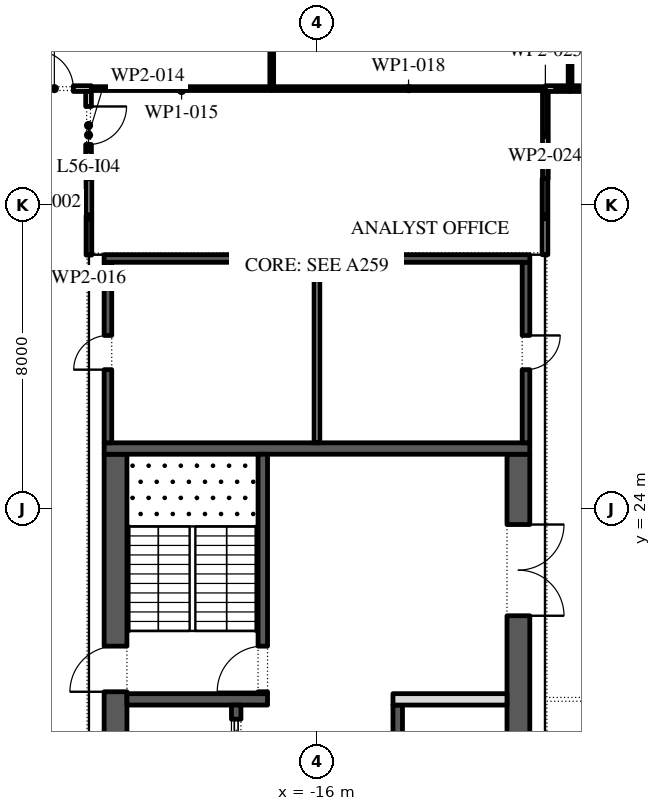
"""IFC4 building model, lengths in metres.
Left out: names, types, materials, properties, quantities, classifications, styles, units other than length and angle.
Written with IfcOpenShell. Run it as: python <this file> out.ifc"""

import sys

from ifc_helpers import new_model, si_unit, direction, frame, frame_2d, origin, place, context, subcontext, project, spatial, rectangle, extrude, element, fill, save


model = new_model("IFC4")
c1 = context("Model", 3, precision=1e-05, world=origin(), true_north=direction((0.0, 1.0)))
c2 = subcontext(c1, "Body", "Model", "MODEL_VIEW")
j1 = project(units=[si_unit("LENGTHUNIT", "METRE"), si_unit("PLANEANGLEUNIT", "RADIAN")], contexts=[c1])
p1 = place(None, origin())
s1 = spatial("IfcSite", under=j1, at=p1, CompositionType="ELEMENT")
p2 = place(p1, origin())
s2 = spatial("IfcBuilding", under=s1, at=p2, CompositionType="ELEMENT")
p3 = place(p2, frame((0.0, 0.0, 259.8)))
s3 = spatial("IfcBuildingStorey", under=s2, at=p3, CompositionType="ELEMENT", Elevation=259.8)
p4 = place(p3, frame((-21.359, 48.678, 0.0), z_axis=(0.0, 0.0, 1.0), x_axis=(-0.224949198343, -0.974370493275, 0.0)))
e1 = element("IfcWall", 1, at=p4, inside=s3, PredefinedType="STANDARD", context=c2, shape_type="SweptSolid", body=[
    extrude(rectangle(XDim=49.5, YDim=0.3, at=frame_2d((24.75, 0.0))), origin(), (0.0, 0.0, 1.0), 4.0),
])
p5 = place(p4, frame((1.157, 0.0, 0.45)))
e2 = element("IfcOpeningElement", 2, at=p5, cuts=e1, PredefinedType="OPENING", context=c2, shape_type="SweptSolid", body=[
    extrude(rectangle(XDim=4.5, YDim=3.05, at=frame_2d((2.25, 1.525))), frame((0.0, 0.16, 0.0), z_axis=(0.0, -1.0, 0.0), x_axis=(1.0, 0.0, 0.0)), (0.0, 0.0, 1.0), 0.32),
])
p6 = place(p4, frame((9.171, 0.0, 0.0)))
e3 = element("IfcOpeningElement", 3, at=p6, cuts=e1, PredefinedType="OPENING", context=c2, shape_type="SweptSolid", body=[
    extrude(rectangle(XDim=2.4, YDim=3.5, at=frame_2d((1.2, 1.75))), frame((0.0, 0.16, 0.0), z_axis=(0.0, -1.0, 0.0), x_axis=(1.0, 0.0, 0.0)), (0.0, 0.0, 1.0), 0.32),
])
p7 = place(p4, frame((15.236, 0.0, 0.45)))
e4 = element("IfcOpeningElement", 4, at=p7, cuts=e1, PredefinedType="OPENING", context=c2, shape_type="SweptSolid", body=[
    extrude(rectangle(XDim=4.5, YDim=3.05, at=frame_2d((2.25, 1.525))), frame((0.0, 0.16, 0.0), z_axis=(0.0, -1.0, 0.0), x_axis=(1.0, 0.0, 0.0)), (0.0, 0.0, 1.0), 0.32),
])
p8 = place(p4, frame((22.35, 0.0, 0.45)))
e5 = element("IfcOpeningElement", 5, at=p8, cuts=e1, PredefinedType="OPENING", context=c2, shape_type="SweptSolid", body=[
    extrude(rectangle(XDim=4.5, YDim=3.05, at=frame_2d((2.25, 1.525))), frame((0.0, 0.16, 0.0), z_axis=(0.0, -1.0, 0.0), x_axis=(1.0, 0.0, 0.0)), (0.0, 0.0, 1.0), 0.32),
])
p9 = place(p4, frame((29.464, 0.0, 0.45)))
e6 = element("IfcOpeningElement", 6, at=p9, cuts=e1, PredefinedType="OPENING", context=c2, shape_type="SweptSolid", body=[
    extrude(rectangle(XDim=4.5, YDim=3.05, at=frame_2d((2.25, 1.525))), frame((0.0, 0.16, 0.0), z_axis=(0.0, -1.0, 0.0), x_axis=(1.0, 0.0, 0.0)), (0.0, 0.0, 1.0), 0.32),
])
p10 = place(p4, frame((37.628, 0.0, 0.0)))
e7 = element("IfcOpeningElement", 7, at=p10, cuts=e1, PredefinedType="OPENING", context=c2, shape_type="SweptSolid", body=[
    extrude(rectangle(XDim=2.4, YDim=3.325, at=frame_2d((1.2, 1.663))), frame((0.0, 0.16, 0.0), z_axis=(0.0, -1.0, 0.0), x_axis=(1.0, 0.0, 0.0)), (0.0, 0.0, 1.0), 0.32),
])
p11 = place(p4, frame((43.693, 0.0, 0.45)))
e8 = element("IfcOpeningElement", 8, at=p11, cuts=e1, PredefinedType="OPENING", context=c2, shape_type="SweptSolid", body=[
    extrude(rectangle(XDim=4.5, YDim=2.825, at=frame_2d((2.25, 1.413))), frame((0.0, 0.16, 0.0), z_axis=(0.0, -1.0, 0.0), x_axis=(1.0, 0.0, 0.0)), (0.0, 0.0, 1.0), 0.32),
])
p12 = place(p3, frame((-21.3, -2.45, 0.0), z_axis=(0.0, 0.0, 1.0), x_axis=(0.0, 1.0, 0.0)))
e9 = element("IfcWall", 9, at=p12, inside=s3, PredefinedType="SHEAR", context=c2, shape_type="SweptSolid", body=[
    extrude(rectangle(XDim=27.9, YDim=0.6, at=frame_2d((13.95, 0.0))), origin(), (0.0, 0.0, 1.0), 4.0),
])
p13 = place(p12, frame((5.05, 0.0, 0.0)))
e10 = element("IfcOpeningElement", 10, at=p13, cuts=e9, PredefinedType="OPENING", context=c2, shape_type="SweptSolid", body=[
    extrude(rectangle(XDim=1.2, YDim=2.1, at=frame_2d((0.6, 1.05))), frame((0.0, 0.31, 0.0), z_axis=(0.0, -1.0, 0.0), x_axis=(1.0, 0.0, 0.0)), (0.0, 0.0, 1.0), 0.62),
])
p14 = place(p12, frame((21.65, 0.0, 0.0)))
e11 = element("IfcOpeningElement", 11, at=p14, cuts=e9, PredefinedType="OPENING", context=c2, shape_type="SweptSolid", body=[
    extrude(rectangle(XDim=1.2, YDim=2.1, at=frame_2d((0.6, 1.05))), frame((0.0, 0.31, 0.0), z_axis=(0.0, -1.0, 0.0), x_axis=(1.0, 0.0, 0.0)), (0.0, 0.0, 1.0), 0.62),
])
p15 = place(p3, frame((-10.7, -2.45, 0.0), z_axis=(0.0, 0.0, 1.0), x_axis=(0.0, 1.0, 0.0)))
e12 = element("IfcWall", 12, at=p15, inside=s3, PredefinedType="SHEAR", context=c2, shape_type="SweptSolid", body=[
    extrude(rectangle(XDim=27.9, YDim=0.6, at=frame_2d((13.95, 0.0))), origin(), (0.0, 0.0, 1.0), 4.0),
])
p16 = place(p15, frame((23.65, 0.0, 0.0)))
e13 = element("IfcOpeningElement", 13, at=p16, cuts=e12, PredefinedType="OPENING", context=c2, shape_type="SweptSolid", body=[
    extrude(rectangle(XDim=2.4, YDim=2.1, at=frame_2d((1.2, 1.05))), frame((0.0, 0.31, 0.0), z_axis=(0.0, -1.0, 0.0), x_axis=(1.0, 0.0, 0.0)), (0.0, 0.0, 1.0), 0.62),
])
p17 = place(p15, frame((1.087, 0.0, 0.0)))
e14 = element("IfcOpeningElement", 14, at=p17, cuts=e12, PredefinedType="OPENING", context=c2, shape_type="SweptSolid", body=[
    extrude(rectangle(XDim=0.9, YDim=2.1, at=frame_2d((0.45, 1.05))), frame((0.0, 0.31, 0.0), z_axis=(0.0, -1.0, 0.0), x_axis=(1.0, 0.0, 0.0)), (0.0, 0.0, 1.0), 0.62),
])
p18 = place(p15, frame((4.262, 0.0, 0.0)))
e15 = element("IfcOpeningElement", 15, at=p18, cuts=e12, PredefinedType="OPENING", context=c2, shape_type="SweptSolid", body=[
    extrude(rectangle(XDim=1.0, YDim=2.1, at=frame_2d((0.5, 1.05))), frame((0.0, 0.31, 0.0), z_axis=(0.0, -1.0, 0.0), x_axis=(1.0, 0.0, 0.0)), (0.0, 0.0, 1.0), 0.62),
])
p19 = place(p3, frame((-21.6, 25.6, 0.0), z_axis=(0.0, 0.0, 1.0), x_axis=(1.0, 0.0, 0.0)))
e16 = element("IfcWall", 16, at=p19, inside=s3, PredefinedType="SHEAR", context=c2, shape_type="SweptSolid", body=[
    extrude(rectangle(XDim=11.2, YDim=0.3, at=frame_2d((5.6, 0.0))), origin(), (0.0, 0.0, 1.0), 4.0),
])
p20 = place(p3, frame((-21.0, 19.0, 0.0), z_axis=(0.0, 0.0, 1.0), x_axis=(1.0, 0.0, 0.0)))
e17 = element("IfcWall", 17, at=p20, inside=s3, PredefinedType="SHEAR", context=c2, shape_type="SweptSolid", body=[
    extrude(rectangle(XDim=3.7, YDim=0.3, at=frame_2d((1.85, 0.0))), origin(), (0.0, 0.0, 1.0), 4.0),
])
p21 = place(p3, frame((-17.425, 19.15, 0.0), z_axis=(0.0, 0.0, 1.0), x_axis=(0.0, 1.0, 0.0)))
e18 = element("IfcWall", 18, at=p21, inside=s3, PredefinedType="SHEAR", context=c2, shape_type="SweptSolid", body=[
    extrude(rectangle(XDim=6.3, YDim=0.25, at=frame_2d((3.15, 0.0))), origin(), (0.0, 0.0, 1.0), 4.0),
])
p22 = place(p21, frame((0.05, 0.0, 0.0)))
e19 = element("IfcOpeningElement", 19, at=p22, cuts=e18, PredefinedType="OPENING", context=c2, shape_type="SweptSolid", body=[
    extrude(rectangle(XDim=1.2, YDim=2.1, at=frame_2d((0.6, 1.05))), frame((0.0, 0.135, 0.0), z_axis=(0.0, -1.0, 0.0), x_axis=(1.0, 0.0, 0.0)), (0.0, 0.0, 1.0), 0.27),
])
p23 = place(p3, frame((-18.125, 4.15, 0.0), z_axis=(0.0, 0.0, 1.0), x_axis=(0.0, 1.0, 0.0)))
e20 = element("IfcWall", 20, at=p23, inside=s3, PredefinedType="SHEAR", context=c2, shape_type="SweptSolid", body=[
    extrude(rectangle(XDim=14.7, YDim=0.25, at=frame_2d((7.35, 0.0))), origin(), (0.0, 0.0, 1.0), 4.0),
])
p24 = place(p23, frame((6.9, 0.0, 0.0)))
e21 = element("IfcOpeningElement", 21, at=p24, cuts=e20, PredefinedType="OPENING", context=c2, shape_type="SweptSolid", body=[
    extrude(rectangle(XDim=0.9, YDim=2.1, at=frame_2d((0.45, 1.05))), frame((0.0, 0.135, 0.0), z_axis=(0.0, -1.0, 0.0), x_axis=(1.0, 0.0, 0.0)), (0.0, 0.0, 1.0), 0.27),
])
p25 = place(p23, frame((0.371, 0.0, 0.0)))
e22 = element("IfcOpeningElement", 22, at=p25, cuts=e20, PredefinedType="OPENING", context=c2, shape_type="SweptSolid", body=[
    extrude(rectangle(XDim=1.1, YDim=2.1, at=frame_2d((0.55, 1.05))), frame((0.0, 0.135, 0.0), z_axis=(0.0, -1.0, 0.0), x_axis=(1.0, 0.0, 0.0)), (0.0, 0.0, 1.0), 0.27),
])
p26 = place(p23, frame((13.229, 0.0, 0.0)))
e23 = element("IfcOpeningElement", 23, at=p26, cuts=e20, PredefinedType="OPENING", context=c2, shape_type="SweptSolid", body=[
    extrude(rectangle(XDim=1.1, YDim=2.1, at=frame_2d((0.55, 1.05))), frame((0.0, 0.135, 0.0), z_axis=(0.0, -1.0, 0.0), x_axis=(1.0, 0.0, 0.0)), (0.0, 0.0, 1.0), 0.27),
])
p27 = place(p3, frame((-13.875, -2.45, 0.0), z_axis=(0.0, 0.0, 1.0), x_axis=(0.0, 1.0, 0.0)))
e24 = element("IfcWall", 24, at=p27, inside=s3, PredefinedType="SHEAR", context=c2, shape_type="SweptSolid", body=[
    extrude(rectangle(XDim=21.3, YDim=0.25, at=frame_2d((10.65, 0.0))), origin(), (0.0, 0.0, 1.0), 4.0),
])
p28 = place(p27, frame((17.786, 0.0, 0.0)))
e25 = element("IfcOpeningElement", 25, at=p28, cuts=e24, PredefinedType="OPENING", context=c2, shape_type="SweptSolid", body=[
    extrude(rectangle(XDim=0.9, YDim=2.1, at=frame_2d((0.45, 1.05))), frame((0.0, 0.135, 0.0), z_axis=(0.0, -1.0, 0.0), x_axis=(1.0, 0.0, 0.0)), (0.0, 0.0, 1.0), 0.27),
])
p29 = place(p27, frame((6.971, 0.0, 0.0)))
e26 = element("IfcOpeningElement", 26, at=p29, cuts=e24, PredefinedType="OPENING", context=c2, shape_type="SweptSolid", body=[
    extrude(rectangle(XDim=1.1, YDim=2.1, at=frame_2d((0.55, 1.05))), frame((0.0, 0.135, 0.0), z_axis=(0.0, -1.0, 0.0), x_axis=(1.0, 0.0, 0.0)), (0.0, 0.0, 1.0), 0.27),
])
p30 = place(p27, frame((9.114, 0.0, 0.0)))
e27 = element("IfcOpeningElement", 27, at=p30, cuts=e24, PredefinedType="OPENING", context=c2, shape_type="SweptSolid", body=[
    extrude(rectangle(XDim=1.1, YDim=2.1, at=frame_2d((0.55, 1.05))), frame((0.0, 0.135, 0.0), z_axis=(0.0, -1.0, 0.0), x_axis=(1.0, 0.0, 0.0)), (0.0, 0.0, 1.0), 0.27),
])
p31 = place(p27, frame((11.257, 0.0, 0.0)))
e28 = element("IfcOpeningElement", 28, at=p31, cuts=e24, PredefinedType="OPENING", context=c2, shape_type="SweptSolid", body=[
    extrude(rectangle(XDim=1.1, YDim=2.1, at=frame_2d((0.55, 1.05))), frame((0.0, 0.135, 0.0), z_axis=(0.0, -1.0, 0.0), x_axis=(1.0, 0.0, 0.0)), (0.0, 0.0, 1.0), 0.27),
])
p32 = place(p27, frame((13.4, 0.0, 0.0)))
e29 = element("IfcOpeningElement", 29, at=p32, cuts=e24, PredefinedType="OPENING", context=c2, shape_type="SweptSolid", body=[
    extrude(rectangle(XDim=1.1, YDim=2.1, at=frame_2d((0.55, 1.05))), frame((0.0, 0.135, 0.0), z_axis=(0.0, -1.0, 0.0), x_axis=(1.0, 0.0, 0.0)), (0.0, 0.0, 1.0), 0.27),
])
p33 = place(p3, frame((-14.0, 19.0, 0.0), z_axis=(0.0, 0.0, 1.0), x_axis=(1.0, 0.0, 0.0)))
e30 = element("IfcWall", 30, at=p33, inside=s3, PredefinedType="PARTITIONING", context=c2, shape_type="SweptSolid", body=[
    extrude(rectangle(XDim=3.0, YDim=0.3, at=frame_2d((1.5, 0.0))), origin(), (0.0, 0.0, 1.0), 4.0),
])
p34 = place(p3, frame((-21.5, 25.75, 0.0), z_axis=(0.0, 0.0, 1.0), x_axis=(0.0, 1.0, 0.0)))
e31 = element("IfcWall", 31, at=p34, inside=s3, PredefinedType="SHEAR", context=c2, shape_type="SweptSolid", body=[
    extrude(rectangle(XDim=4.75, YDim=0.2, at=frame_2d((2.375, 0.0))), origin(), (0.0, 0.0, 1.0), 4.0),
])
p35 = place(p34, frame((1.925, 0.0, 0.0)))
e32 = element("IfcOpeningElement", 32, at=p35, cuts=e31, PredefinedType="OPENING", context=c2, shape_type="SweptSolid", body=[
    extrude(rectangle(XDim=0.9, YDim=2.1, at=frame_2d((0.45, 1.05))), frame((0.0, 0.11, 0.0), z_axis=(0.0, -1.0, 0.0), x_axis=(1.0, 0.0, 0.0)), (0.0, 0.0, 1.0), 0.22),
])
p36 = place(p3, frame((-10.5, 25.75, 0.0), z_axis=(0.0, 0.0, 1.0), x_axis=(0.0, 1.0, 0.0)))
e33 = element("IfcWall", 33, at=p36, inside=s3, PredefinedType="SHEAR", context=c2, shape_type="SweptSolid", body=[
    extrude(rectangle(XDim=4.75, YDim=0.2, at=frame_2d((2.375, 0.0))), origin(), (0.0, 0.0, 1.0), 4.0),
])
p37 = place(p36, frame((1.925, 0.0, 0.0)))
e34 = element("IfcOpeningElement", 34, at=p37, cuts=e33, PredefinedType="OPENING", context=c2, shape_type="SweptSolid", body=[
    extrude(rectangle(XDim=0.9, YDim=2.1, at=frame_2d((0.45, 1.05))), frame((0.0, 0.11, 0.0), z_axis=(0.0, -1.0, 0.0), x_axis=(1.0, 0.0, 0.0)), (0.0, 0.0, 1.0), 0.22),
])
p38 = place(p3, frame((-21.6, 30.6, 0.0), z_axis=(0.0, 0.0, 1.0), x_axis=(1.0, 0.0, 0.0)))
e35 = element("IfcWall", 35, at=p38, inside=s3, PredefinedType="SHEAR", context=c2, shape_type="SweptSolid", body=[
    extrude(rectangle(XDim=11.2, YDim=0.2, at=frame_2d((5.6, 0.0))), origin(), (0.0, 0.0, 1.0), 4.0),
])
p39 = place(p3, frame((-16.0, 25.75, 0.0), z_axis=(0.0, 0.0, 1.0), x_axis=(0.0, 1.0, 0.0)))
e36 = element("IfcWall", 36, at=p39, inside=s3, PredefinedType="PARTITIONING", context=c2, shape_type="SweptSolid", body=[
    extrude(rectangle(XDim=4.75, YDim=0.15, at=frame_2d((2.375, 0.0))), origin(), (0.0, 0.0, 1.0), 4.0),
])
p40 = place(p3, frame((-24.429, 35.07, 0.0), z_axis=(0.0, 0.0, 1.0), x_axis=(1.0, 0.0, 0.0)))
e37 = element("IfcWall", 37, at=p40, inside=s3, PredefinedType="PARTITIONING", context=c2, shape_type="SweptSolid", body=[
    extrude(rectangle(XDim=2.494, YDim=0.15, at=frame_2d((1.247, 0.0))), origin(), (0.0, 0.0, 1.0), 4.0),
])
p41 = place(p40, frame((1.019, 0.0, 0.0)))
e38 = element("IfcOpeningElement", 38, at=p41, cuts=e37, PredefinedType="OPENING", context=c2, shape_type="SweptSolid", body=[
    extrude(rectangle(XDim=1.0, YDim=2.1, at=frame_2d((0.5, 1.05))), frame((0.0, 0.085, 0.0), z_axis=(0.0, -1.0, 0.0), x_axis=(1.0, 0.0, 0.0)), (0.0, 0.0, 1.0), 0.17),
])
p42 = place(p3, frame((-22.01, 34.995, 0.0), z_axis=(0.0, 0.0, 1.0), x_axis=(0.0, -1.0, 0.0)))
e39 = element("IfcWall", 39, at=p42, inside=s3, PredefinedType="PARTITIONING", context=c2, shape_type="SweptSolid", body=[
    extrude(rectangle(XDim=2.295, YDim=0.15, at=frame_2d((1.147, 0.0))), origin(), (0.0, 0.0, 1.0), 4.0),
])
p43 = place(p42, frame((0.395, 0.0, 0.0)))
e40 = element("IfcOpeningElement", 40, at=p43, cuts=e39, PredefinedType="OPENING", context=c2, shape_type="SweptSolid", body=[
    extrude(rectangle(XDim=1.0, YDim=2.1, at=frame_2d((0.5, 1.05))), frame((0.0, 0.085, 0.0), z_axis=(0.0, -1.0, 0.0), x_axis=(1.0, 0.0, 0.0)), (0.0, 0.0, 1.0), 0.17),
])
p44 = place(p3, frame((-21.935, 35.07, 0.0), z_axis=(0.0, 0.0, 1.0), x_axis=(1.0, 0.0, 0.0)))
e41 = element("IfcWall", 41, at=p44, inside=s3, PredefinedType="PARTITIONING", context=c2, shape_type="SweptSolid", body=[
    extrude(rectangle(XDim=4.745, YDim=0.1, at=frame_2d((2.373, 0.0))), origin(), (0.0, 0.0, 1.0), 4.0),
])
p45 = place(p3, frame((-22.0, 32.7, 0.0), z_axis=(0.0, 0.0, 1.0), x_axis=(0.0, -1.0, 0.0)))
e42 = element("IfcWall", 42, at=p45, inside=s3, PredefinedType="PARTITIONING", context=c2, shape_type="SweptSolid", body=[
    extrude(rectangle(XDim=2.01, YDim=0.15, at=frame_2d((1.005, 0.0))), origin(), (0.0, 0.0, 1.0), 4.0),
])
p46 = place(p3, frame((-17.19, 35.12, 0.0), z_axis=(0.0, 0.0, 1.0), x_axis=(0.0, 1.0, 0.0)))
e43 = element("IfcWall", 43, at=p46, inside=s3, PredefinedType="PARTITIONING", context=c2, shape_type="SweptSolid", body=[
    extrude(rectangle(XDim=6.83, YDim=0.1, at=frame_2d((3.415, 0.0))), origin(), (0.0, 0.0, 1.0), 4.0),
])
p47 = place(p3, frame((-17.19, 35.07, 0.0), z_axis=(0.0, 0.0, 1.0), x_axis=(1.0, 0.0, 0.0)))
e44 = element("IfcWall", 44, at=p47, inside=s3, PredefinedType="PARTITIONING", context=c2, shape_type="SweptSolid", body=[
    extrude(rectangle(XDim=7.2, YDim=0.1, at=frame_2d((3.6, 0.0))), origin(), (0.0, 0.0, 1.0), 4.0),
])
p48 = place(p3, frame((-10.0, 30.7, 0.0), z_axis=(0.0, 0.0, 1.0), x_axis=(0.0, 1.0, 0.0)))
e45 = element("IfcWall", 45, at=p48, inside=s3, PredefinedType="PARTITIONING", context=c2, shape_type="SweptSolid", body=[
    extrude(rectangle(XDim=2.0, YDim=0.15, at=frame_2d((1.0, 0.0))), origin(), (0.0, 0.0, 1.0), 4.0),
])
p49 = place(p3, frame((-9.99, 32.7, 0.0), z_axis=(0.0, 0.0, 1.0), x_axis=(0.0, 1.0, 0.0)))
e46 = element("IfcWall", 46, at=p49, inside=s3, PredefinedType="PARTITIONING", context=c2, shape_type="SweptSolid", body=[
    extrude(rectangle(XDim=2.32, YDim=0.15, at=frame_2d((1.16, 0.0))), origin(), (0.0, 0.0, 1.0), 4.0),
])
p50 = place(p3, frame((-9.99, 35.07, 0.0), z_axis=(0.0, 0.0, 1.0), x_axis=(1.0, 0.0, 0.0)))
e47 = element("IfcWall", 47, at=p50, inside=s3, PredefinedType="PARTITIONING", context=c2, shape_type="SweptSolid", body=[
    extrude(rectangle(XDim=0.65, YDim=0.15, at=frame_2d((0.325, 0.0))), origin(), (0.0, 0.0, 1.0), 4.0),
])
p51 = place(p3, frame((-9.34, 35.145, 0.0), z_axis=(0.0, 0.0, 1.0), x_axis=(0.0, 1.0, 0.0)))
e48 = element("IfcWall", 48, at=p51, inside=s3, PredefinedType="PARTITIONING", context=c2, shape_type="SweptSolid", body=[
    extrude(rectangle(XDim=8.405, YDim=0.1, at=frame_2d((4.203, 0.0))), origin(), (0.0, 0.0, 1.0), 4.0),
])
p52 = place(p51, frame((4.505, 0.0, 0.0)))
e49 = element("IfcOpeningElement", 49, at=p52, cuts=e48, PredefinedType="OPENING", context=c2, shape_type="SweptSolid", body=[
    extrude(rectangle(XDim=0.9, YDim=2.1, at=frame_2d((0.45, 1.05))), frame((0.0, 0.06, 0.0), z_axis=(0.0, -1.0, 0.0), x_axis=(1.0, 0.0, 0.0)), (0.0, 0.0, 1.0), 0.12),
])
p53 = place(p3, frame((-9.34, 35.07, 0.0), z_axis=(0.0, 0.0, 1.0), x_axis=(1.0, 0.0, 0.0)))
e50 = element("IfcWall", 50, at=p53, inside=s3, PredefinedType="PARTITIONING", context=c2, shape_type="SweptSolid", body=[
    extrude(rectangle(XDim=1.405, YDim=0.15, at=frame_2d((0.703, 0.0))), origin(), (0.0, 0.0, 1.0), 4.0),
])
p54 = place(p26, origin())
e51 = element("IfcDoor", 51, at=p54, inside=s3, OperationType="SLIDING_TO_LEFT", PredefinedType="DOOR", context=c2, shape_type="SweptSolid", body=[
    extrude(rectangle(XDim=1.1, YDim=2.1, at=frame_2d((0.55, 1.05))), frame((0.0, 0.025, 0.0), z_axis=(0.0, -1.0, 0.0), x_axis=(1.0, 0.0, 0.0)), (0.0, 0.0, 1.0), 0.05),
])
fill(e23, e51)
p55 = place(p16, frame((2.4, 0.0, 0.0), z_axis=(0.0, 0.0, 1.0), x_axis=(-1.0, 0.0, 0.0)))
e52 = element("IfcDoor", 52, at=p55, inside=s3, OperationType="DOUBLE_DOOR_SINGLE_SWING", PredefinedType="DOOR", context=c2, shape_type="SweptSolid", body=[
    extrude(rectangle(XDim=2.4, YDim=2.1, at=frame_2d((1.2, 1.05))), frame((0.0, 0.025, 0.0), z_axis=(0.0, -1.0, 0.0), x_axis=(1.0, 0.0, 0.0)), (0.0, 0.0, 1.0), 0.05),
])
fill(e13, e52)
p56 = place(p22, origin())
e53 = element("IfcDoor", 53, at=p56, inside=s3, OperationType="SINGLE_SWING_RIGHT", PredefinedType="DOOR", context=c2, shape_type="SweptSolid", body=[
    extrude(rectangle(XDim=1.2, YDim=2.1, at=frame_2d((0.6, 1.05))), frame((0.0, 0.025, 0.0), z_axis=(0.0, -1.0, 0.0), x_axis=(1.0, 0.0, 0.0)), (0.0, 0.0, 1.0), 0.05),
])
fill(e19, e53)
p57 = place(p14, origin())
e54 = element("IfcDoor", 54, at=p57, inside=s3, OperationType="SINGLE_SWING_RIGHT", PredefinedType="DOOR", context=c2, shape_type="SweptSolid", body=[
    extrude(rectangle(XDim=1.2, YDim=2.1, at=frame_2d((0.6, 1.05))), frame((0.0, 0.025, 0.0), z_axis=(0.0, -1.0, 0.0), x_axis=(1.0, 0.0, 0.0)), (0.0, 0.0, 1.0), 0.05),
])
fill(e11, e54)
p58 = place(p35, origin())
e55 = element("IfcDoor", 55, at=p58, inside=s3, OperationType="SINGLE_SWING_RIGHT", PredefinedType="DOOR", context=c2, shape_type="SweptSolid", body=[
    extrude(rectangle(XDim=0.9, YDim=2.1, at=frame_2d((0.45, 1.05))), frame((0.0, -0.05, 0.0), z_axis=(0.0, -1.0, 0.0), x_axis=(1.0, 0.0, 0.0)), (0.0, 0.0, 1.0), 0.05),
])
fill(e32, e55)
p59 = place(p37, frame((0.9, 0.15, 0.0), z_axis=(0.0, 0.0, 1.0), x_axis=(-1.0, 0.0, 0.0)))
e56 = element("IfcDoor", 56, at=p59, inside=s3, OperationType="SINGLE_SWING_RIGHT", PredefinedType="DOOR", context=c2, shape_type="SweptSolid", body=[
    extrude(rectangle(XDim=0.9, YDim=2.1, at=frame_2d((0.45, 1.05))), frame((0.0, 0.1, 0.0), z_axis=(0.0, -1.0, 0.0), x_axis=(1.0, 0.0, 0.0)), (0.0, 0.0, 1.0), 0.05),
])
fill(e34, e56)
p60 = place(p43, origin())
e57 = element("IfcDoor", 57, at=p60, inside=s3, OperationType="SINGLE_SWING_RIGHT", PredefinedType="DOOR", context=c2, shape_type="SweptSolid", body=[
    extrude(rectangle(XDim=1.0, YDim=2.1, at=frame_2d((0.5, 1.05))), frame((0.0, 0.025, 0.0), z_axis=(0.0, -1.0, 0.0), x_axis=(1.0, 0.0, 0.0)), (0.0, 0.0, 1.0), 0.05),
])
fill(e40, e57)
p61 = place(p41, origin())
e58 = element("IfcDoor", 58, at=p61, inside=s3, OperationType="SINGLE_SWING_RIGHT", PredefinedType="DOOR", context=c2, shape_type="SweptSolid", body=[
    extrude(rectangle(XDim=1.0, YDim=2.1, at=frame_2d((0.5, 1.05))), frame((0.0, 0.025, 0.0), z_axis=(0.0, -1.0, 0.0), x_axis=(1.0, 0.0, 0.0)), (0.0, 0.0, 1.0), 0.05),
])
fill(e38, e58)
save(model, sys.argv[1])
